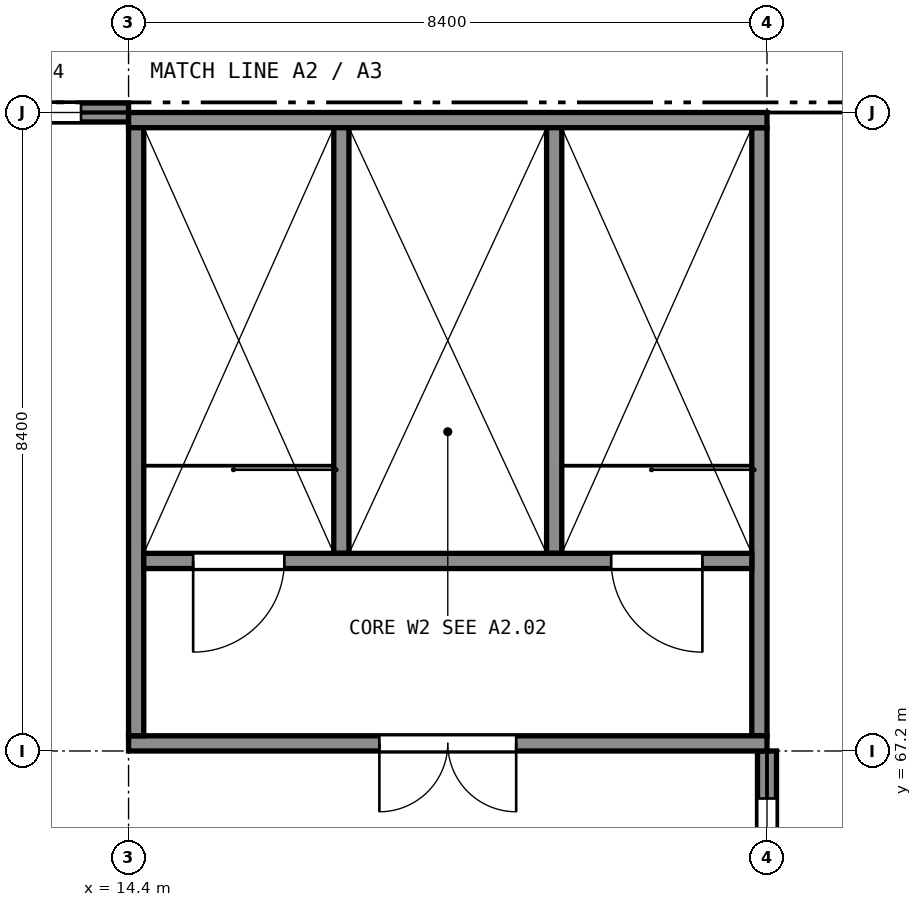
"""IFC4 building model, lengths in metres.
Left out: names, types, materials, properties, quantities, classifications, styles, units other than length and angle.
Written with IfcOpenShell. Run it as: python <this file> out.ifc"""

import sys

from ifc_helpers import new_model, si_unit, direction, frame, frame_2d, origin, place, context, subcontext, project, spatial, polyline, rectangle, outline, extrude, element, fill, save


model = new_model("IFC4")
c1 = context("Model", 3, precision=1e-05, world=origin(), true_north=direction((0.0, 1.0)))
c2 = subcontext(c1, "Body", "Model", "MODEL_VIEW")
j1 = project(units=[si_unit("LENGTHUNIT", "METRE"), si_unit("PLANEANGLEUNIT", "RADIAN")], contexts=[c1])
p1 = place(None, origin())
s1 = spatial("IfcSite", under=j1, at=p1, CompositionType="ELEMENT")
p2 = place(p1, origin())
s2 = spatial("IfcBuilding", under=s1, at=p2, CompositionType="ELEMENT")
p3 = place(p2, frame((0.0, 0.0, 20.0)))
s3 = spatial("IfcBuildingStorey", under=s2, at=p3, CompositionType="ELEMENT", Elevation=20.0)
p4 = place(p3, frame((14.4, 67.3, 0.0), z_axis=(0.0, 0.0, 1.0), x_axis=(1.0, 0.0, 0.0)))
e1 = element("IfcWall", 1, at=p4, inside=s3, PredefinedType="SHEAR", context=c2, shape_type="SweptSolid", body=[
    extrude(outline(polyline([(0.0, 0.0), (8.4, 0.0), (8.4, 8.8), (7.531, 8.572), (7.241, 8.497), (5.503, 8.041), (5.214, 7.966), (3.186, 7.434), (2.896, 7.359), (1.159, 6.903), (0.869, 6.828), (0.0, 6.6), (0.0, 0.0)])), frame((0.0, 0.1, 0.0), z_axis=(0.0, -1.0, 0.0), x_axis=(1.0, 0.0, 0.0)), (0.0, 0.0, 1.0), 0.2),
])
p5 = place(p4, frame((3.3, 0.0, 0.0)))
e2 = element("IfcOpeningElement", 2, at=p5, cuts=e1, PredefinedType="OPENING", context=c2, shape_type="SweptSolid", body=[
    extrude(rectangle(XDim=1.8, YDim=2.1, at=frame_2d((0.9, 1.05))), frame((0.0, 0.11, 0.0), z_axis=(0.0, -1.0, 0.0), x_axis=(1.0, 0.0, 0.0)), (0.0, 0.0, 1.0), 0.22),
])
p6 = place(p3, frame((14.4, 75.5, 0.0), z_axis=(0.0, 0.0, 1.0), x_axis=(1.0, 0.0, 0.0)))
e3 = element("IfcWall", 3, at=p6, inside=s3, PredefinedType="SHEAR", context=c2, shape_type="SweptSolid", body=[
    extrude(outline(polyline([(0.0, 0.0), (8.4, 0.0), (8.4, 8.8), (7.531, 8.572), (7.241, 8.497), (5.503, 8.041), (5.214, 7.966), (3.186, 7.434), (2.896, 7.359), (1.159, 6.903), (0.869, 6.828), (0.0, 6.6), (0.0, 0.0)])), frame((0.0, 0.1, 0.0), z_axis=(0.0, -1.0, 0.0), x_axis=(1.0, 0.0, 0.0)), (0.0, 0.0, 1.0), 0.2),
])
p7 = place(p3, frame((14.5, 67.4, 0.0), z_axis=(0.0, 0.0, 1.0), x_axis=(0.0, 1.0, 0.0)))
e4 = element("IfcWall", 4, at=p7, inside=s3, PredefinedType="SHEAR", context=c2, shape_type="SweptSolid", body=[
    extrude(rectangle(XDim=8.0, YDim=0.2, at=frame_2d((4.0, 0.0))), origin(), (0.0, 0.0, 1.0), 6.625),
])
p8 = place(p3, frame((22.7, 67.4, 0.0), z_axis=(0.0, 0.0, 1.0), x_axis=(0.0, 1.0, 0.0)))
e5 = element("IfcWall", 5, at=p8, inside=s3, PredefinedType="SHEAR", context=c2, shape_type="SweptSolid", body=[
    extrude(rectangle(XDim=8.0, YDim=0.2, at=frame_2d((4.0, 0.0))), origin(), (0.0, 0.0, 1.0), 8.775),
])
p9 = place(p3, frame((14.6, 69.7, 0.0), z_axis=(0.0, 0.0, 1.0), x_axis=(1.0, 0.0, 0.0)))
e6 = element("IfcWall", 6, at=p9, inside=s3, PredefinedType="SHEAR", context=c2, shape_type="SweptSolid", body=[
    extrude(outline(polyline([(0.0, 0.0), (8.0, 0.0), (8.0, 8.748), (7.407, 8.592), (7.111, 8.515), (6.815, 8.437), (6.519, 8.36), (5.926, 8.204), (5.63, 8.127), (5.333, 8.049), (5.037, 7.972), (4.444, 7.816), (4.148, 7.739), (3.852, 7.661), (3.556, 7.584), (2.963, 7.428), (2.667, 7.351), (2.37, 7.273), (2.074, 7.196), (1.481, 7.04), (1.185, 6.963), (0.889, 6.885), (0.593, 6.808), (0.0, 6.652), (0.0, 0.0)])), frame((0.0, 0.1, 0.0), z_axis=(0.0, -1.0, 0.0), x_axis=(1.0, 0.0, 0.0)), (0.0, 0.0, 1.0), 0.2),
])
p10 = place(p9, frame((0.65, 0.0, 0.0)))
e7 = element("IfcOpeningElement", 7, at=p10, cuts=e6, PredefinedType="OPENING", context=c2, shape_type="SweptSolid", body=[
    extrude(rectangle(XDim=1.2, YDim=2.1, at=frame_2d((0.6, 1.05))), frame((0.0, 0.11, 0.0), z_axis=(0.0, -1.0, 0.0), x_axis=(1.0, 0.0, 0.0)), (0.0, 0.0, 1.0), 0.22),
])
p11 = place(p9, frame((6.15, 0.0, 0.0)))
e8 = element("IfcOpeningElement", 8, at=p11, cuts=e6, PredefinedType="OPENING", context=c2, shape_type="SweptSolid", body=[
    extrude(rectangle(XDim=1.2, YDim=2.1, at=frame_2d((0.6, 1.05))), frame((0.0, 0.11, 0.0), z_axis=(0.0, -1.0, 0.0), x_axis=(1.0, 0.0, 0.0)), (0.0, 0.0, 1.0), 0.22),
])
p12 = place(p3, frame((17.2, 69.8, 0.0), z_axis=(0.0, 0.0, 1.0), x_axis=(0.0, 1.0, 0.0)))
e9 = element("IfcWall", 9, at=p12, inside=s3, PredefinedType="SHEAR", context=c2, shape_type="SweptSolid", body=[
    extrude(rectangle(XDim=5.6, YDim=0.2, at=frame_2d((2.8, 0.0))), origin(), (0.0, 0.0, 1.0), 7.333),
])
p13 = place(p3, frame((20.0, 69.8, 0.0), z_axis=(0.0, 0.0, 1.0), x_axis=(0.0, 1.0, 0.0)))
e10 = element("IfcWall", 10, at=p13, inside=s3, PredefinedType="SHEAR", context=c2, shape_type="SweptSolid", body=[
    extrude(rectangle(XDim=5.6, YDim=0.2, at=frame_2d((2.8, 0.0))), origin(), (0.0, 0.0, 1.0), 8.067),
])
p14 = place(p3, frame((22.8, 59.15, 0.0), z_axis=(0.0, 0.0, 1.0), x_axis=(0.0, 1.0, 0.0)))
e11 = element("IfcWall", 11, at=p14, inside=s3, PredefinedType="SOLIDWALL", context=c2, shape_type="SweptSolid", body=[
    extrude(rectangle(XDim=8.05, YDim=0.25, at=frame_2d((4.025, 0.0))), origin(), (0.0, 0.0, 1.0), 8.746),
])
p15 = place(p14, frame((0.625, 0.0, 0.9)))
e12 = element("IfcOpeningElement", 12, at=p15, cuts=e11, PredefinedType="OPENING", context=c2, shape_type="SweptSolid", body=[
    extrude(rectangle(XDim=1.2, YDim=2.1, at=frame_2d((0.6, 1.05))), frame((0.0, 0.135, 0.0), z_axis=(0.0, -1.0, 0.0), x_axis=(1.0, 0.0, 0.0)), (0.0, 0.0, 1.0), 0.27),
])
p16 = place(p14, frame((4.0, 0.0, 0.9)))
e13 = element("IfcOpeningElement", 13, at=p16, cuts=e11, PredefinedType="OPENING", context=c2, shape_type="SweptSolid", body=[
    extrude(rectangle(XDim=1.2, YDim=2.1, at=frame_2d((0.6, 1.05))), frame((0.0, 0.135, 0.0), z_axis=(0.0, -1.0, 0.0), x_axis=(1.0, 0.0, 0.0)), (0.0, 0.0, 1.0), 0.27),
])
p17 = place(p14, frame((6.225, 0.0, 0.9)))
e14 = element("IfcOpeningElement", 14, at=p17, cuts=e11, PredefinedType="OPENING", context=c2, shape_type="SweptSolid", body=[
    extrude(rectangle(XDim=1.2, YDim=2.1, at=frame_2d((0.6, 1.05))), frame((0.0, 0.135, 0.0), z_axis=(0.0, -1.0, 0.0), x_axis=(1.0, 0.0, 0.0)), (0.0, 0.0, 1.0), 0.27),
])
p18 = place(p3, frame((6.35, 75.6, 0.0), z_axis=(0.0, 0.0, 1.0), x_axis=(1.0, 0.0, 0.0)))
e15 = element("IfcWall", 15, at=p18, inside=s3, PredefinedType="SOLIDWALL", context=c2, shape_type="SweptSolid", body=[
    extrude(outline(polyline([(0.0, 0.0), (8.05, 0.0), (8.05, 6.546), (0.0, 4.437), (0.0, 0.0)])), frame((0.0, 0.125, 0.0), z_axis=(0.0, -1.0, 0.0), x_axis=(1.0, 0.0, 0.0)), (0.0, 0.0, 1.0), 0.25),
])
p19 = place(p18, frame((0.625, 0.0, 0.9)))
e16 = element("IfcOpeningElement", 16, at=p19, cuts=e15, PredefinedType="OPENING", context=c2, shape_type="SweptSolid", body=[
    extrude(rectangle(XDim=1.2, YDim=2.1, at=frame_2d((0.6, 1.05))), frame((0.0, 0.135, 0.0), z_axis=(0.0, -1.0, 0.0), x_axis=(1.0, 0.0, 0.0)), (0.0, 0.0, 1.0), 0.27),
])
p20 = place(p18, frame((4.0, 0.0, 0.9)))
e17 = element("IfcOpeningElement", 17, at=p20, cuts=e15, PredefinedType="OPENING", context=c2, shape_type="SweptSolid", body=[
    extrude(rectangle(XDim=1.2, YDim=2.1, at=frame_2d((0.6, 1.05))), frame((0.0, 0.135, 0.0), z_axis=(0.0, -1.0, 0.0), x_axis=(1.0, 0.0, 0.0)), (0.0, 0.0, 1.0), 0.27),
])
p21 = place(p18, frame((6.225, 0.0, 0.9)))
e18 = element("IfcOpeningElement", 18, at=p21, cuts=e15, PredefinedType="OPENING", context=c2, shape_type="SweptSolid", body=[
    extrude(rectangle(XDim=1.2, YDim=2.1, at=frame_2d((0.6, 1.05))), frame((0.0, 0.135, 0.0), z_axis=(0.0, -1.0, 0.0), x_axis=(1.0, 0.0, 0.0)), (0.0, 0.0, 1.0), 0.27),
])
p22 = place(p17, origin())
e19 = element("IfcWindow", 19, at=p22, inside=s3, PartitioningType="SINGLE_PANEL", PredefinedType="WINDOW", context=c2, shape_type="SweptSolid", body=[
    extrude(rectangle(XDim=1.2, YDim=2.1, at=frame_2d((0.6, 1.05))), frame((0.0, 0.105, 0.0), z_axis=(0.0, -1.0, 0.0), x_axis=(1.0, 0.0, 0.0)), (0.0, 0.0, 1.0), 0.06),
])
fill(e14, e19)
p23 = place(p21, origin())
e20 = element("IfcWindow", 20, at=p23, inside=s3, PartitioningType="SINGLE_PANEL", PredefinedType="WINDOW", context=c2, shape_type="SweptSolid", body=[
    extrude(rectangle(XDim=1.2, YDim=2.1, at=frame_2d((0.6, 1.05))), frame((0.0, -0.045, 0.0), z_axis=(0.0, -1.0, 0.0), x_axis=(1.0, 0.0, 0.0)), (0.0, 0.0, 1.0), 0.06),
])
fill(e18, e20)
p24 = place(p5, origin())
e21 = element("IfcDoor", 21, at=p24, inside=s3, OperationType="DOUBLE_DOOR_SINGLE_SWING", PredefinedType="DOOR", context=c2, shape_type="SweptSolid", body=[
    extrude(rectangle(XDim=1.8, YDim=2.1, at=frame_2d((0.9, 1.05))), frame((0.0, 0.025, 0.0), z_axis=(0.0, -1.0, 0.0), x_axis=(1.0, 0.0, 0.0)), (0.0, 0.0, 1.0), 0.05),
])
fill(e2, e21)
p25 = place(p10, origin())
e22 = element("IfcDoor", 22, at=p25, inside=s3, OperationType="SINGLE_SWING_LEFT", PredefinedType="DOOR", context=c2, shape_type="SweptSolid", body=[
    extrude(rectangle(XDim=1.2, YDim=2.1, at=frame_2d((0.6, 1.05))), frame((0.0, 0.025, 0.0), z_axis=(0.0, -1.0, 0.0), x_axis=(1.0, 0.0, 0.0)), (0.0, 0.0, 1.0), 0.05),
])
fill(e7, e22)
p26 = place(p11, origin())
e23 = element("IfcDoor", 23, at=p26, inside=s3, OperationType="SINGLE_SWING_RIGHT", PredefinedType="DOOR", context=c2, shape_type="SweptSolid", body=[
    extrude(rectangle(XDim=1.2, YDim=2.1, at=frame_2d((0.6, 1.05))), frame((0.0, 0.025, 0.0), z_axis=(0.0, -1.0, 0.0), x_axis=(1.0, 0.0, 0.0)), (0.0, 0.0, 1.0), 0.05),
])
fill(e8, e23)
save(model, sys.argv[1])
